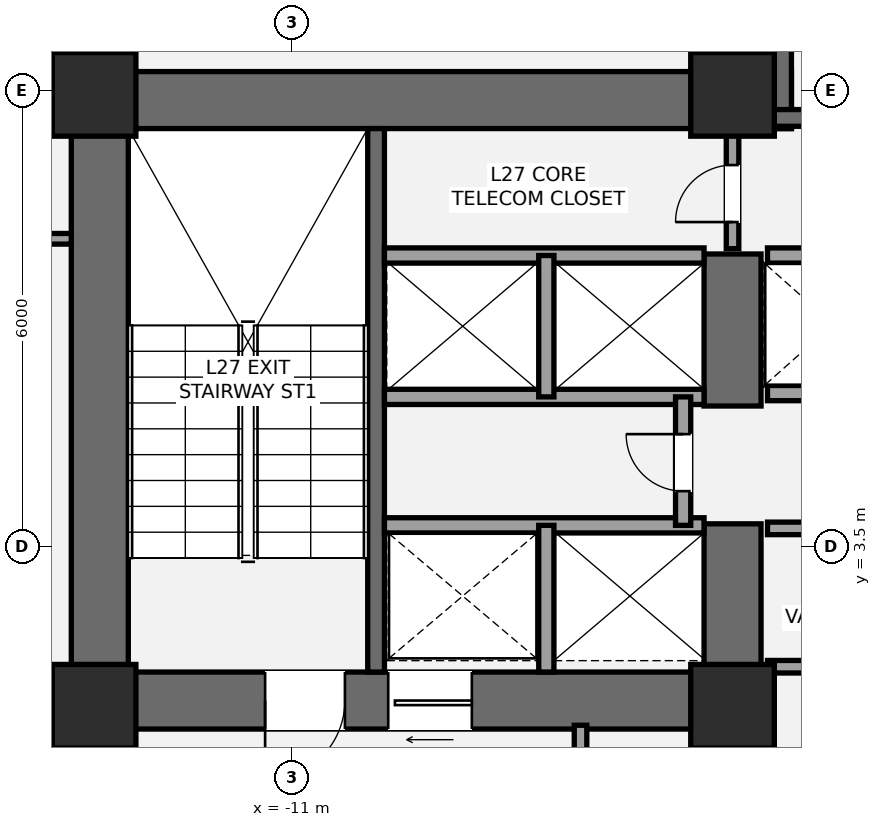
"""IFC4 building model, lengths in metres.
Left out: names, types, materials, properties, quantities, classifications, styles, units other than length and angle.
Written with IfcOpenShell. Run it as: python <this file> out.ifc"""

import sys

from ifc_helpers import new_model, si_unit, direction, frame, frame_2d, origin, origin_2d, place, context, subcontext, project, spatial, rectangle, extrude, element, fill, save


model = new_model("IFC4")
c1 = context("Model", 3, precision=1e-05, world=origin(), true_north=direction((0.0, 1.0)))
c2 = subcontext(c1, "Body", "Model", "MODEL_VIEW")
j1 = project(units=[si_unit("LENGTHUNIT", "METRE"), si_unit("PLANEANGLEUNIT", "RADIAN")], contexts=[c1])
p1 = place(None, origin())
s1 = spatial("IfcSite", under=j1, at=p1, CompositionType="ELEMENT")
p2 = place(p1, origin())
s2 = spatial("IfcBuilding", under=s1, at=p2, CompositionType="ELEMENT")
p3 = place(p2, frame((0.0, 0.0, 103.6)))
s3 = spatial("IfcBuildingStorey", under=s2, at=p3, CompositionType="ELEMENT", Elevation=103.6)
p4 = place(p3, frame((-13.525, 1.1, 0.0), z_axis=(0.0, 0.0, 1.0), x_axis=(0.0, 1.0, 0.0)))
e1 = element("IfcWall", 1, at=p4, inside=s3, PredefinedType="SHEAR", context=c2, shape_type="SweptSolid", body=[
    extrude(rectangle(XDim=8.65, YDim=0.75, at=frame_2d((4.325, 0.0))), origin(), (0.0, 0.0, 1.0), 3.5),
])
p5 = place(p3, frame((-13.9, 9.375, 0.0), z_axis=(0.0, 0.0, 1.0), x_axis=(1.0, 0.0, 0.0)))
e2 = element("IfcWall", 2, at=p5, inside=s3, PredefinedType="SHEAR", context=c2, shape_type="SweptSolid", body=[
    extrude(rectangle(XDim=9.475, YDim=0.75, at=frame_2d((4.737, 0.0))), origin(), (0.0, 0.0, 1.0), 3.5),
])
p6 = place(p3, frame((-4.825, 1.475, 0.0), z_axis=(0.0, 0.0, 1.0), x_axis=(-1.0, 0.0, 0.0)))
e3 = element("IfcWall", 3, at=p6, inside=s3, PredefinedType="SHEAR", context=c2, shape_type="SweptSolid", body=[
    extrude(rectangle(XDim=9.075, YDim=0.75, at=frame_2d((4.538, 0.0))), origin(), (0.0, 0.0, 1.0), 3.5),
])
p7 = place(p6, frame((5.475, 0.0, 0.0)))
e4 = element("IfcOpeningElement", 4, at=p7, cuts=e3, PredefinedType="OPENING", context=c2, shape_type="SweptSolid", body=[
    extrude(rectangle(XDim=1.05, YDim=2.15, at=frame_2d((0.525, 1.075))), frame((0.0, 0.385, 0.0), z_axis=(0.0, -1.0, 0.0), x_axis=(1.0, 0.0, 0.0)), (0.0, 0.0, 1.0), 0.77),
])
p8 = place(p6, frame((3.805, 0.0, 0.0)))
e5 = element("IfcOpeningElement", 5, at=p8, cuts=e3, PredefinedType="OPENING", context=c2, shape_type="SweptSolid", body=[
    extrude(rectangle(XDim=1.1, YDim=2.2, at=frame_2d((0.55, 1.1))), frame((0.0, 0.385, 0.0), z_axis=(0.0, -1.0, 0.0), x_axis=(1.0, 0.0, 0.0)), (0.0, 0.0, 1.0), 0.77),
])
p9 = place(p3, frame((-5.2, 1.1, 0.0), z_axis=(0.0, 0.0, 1.0), x_axis=(0.0, 1.0, 0.0)))
e6 = element("IfcWall", 6, at=p9, inside=s3, PredefinedType="SHEAR", context=c2, shape_type="SweptSolid", body=[
    extrude(rectangle(XDim=2.7, YDim=0.75, at=frame_2d((1.35, 0.0))), origin(), (0.0, 0.0, 1.0), 3.5),
])
p10 = place(p3, frame((-5.2, 5.35, 0.0), z_axis=(0.0, 0.0, 1.0), x_axis=(0.0, 1.0, 0.0)))
e7 = element("IfcWall", 7, at=p10, inside=s3, PredefinedType="SHEAR", context=c2, shape_type="SweptSolid", body=[
    extrude(rectangle(XDim=2.0, YDim=0.75, at=frame_2d((1.0, 0.0))), origin(), (0.0, 0.0, 1.0), 3.5),
])
p11 = place(p3, frame((-9.89, 1.85, 0.0), z_axis=(0.0, 0.0, 1.0), x_axis=(0.0, 1.0, 0.0)))
e8 = element("IfcWall", 8, at=p11, inside=s3, PredefinedType="SHEAR", context=c2, shape_type="SweptSolid", body=[
    extrude(rectangle(XDim=7.15, YDim=0.22, at=frame_2d((3.575, 0.0))), origin(), (0.0, 0.0, 1.0), 3.5),
])
p12 = place(p3, frame((-4.8, 9.0, 0.0), z_axis=(0.0, 0.0, 1.0), x_axis=(0.0, 1.0, 0.0)))
e9 = element("IfcWall", 9, at=p12, inside=s3, PredefinedType="SHEAR", context=c2, shape_type="SweptSolid", body=[
    extrude(rectangle(XDim=4.15, YDim=0.75, at=frame_2d((2.075, 0.0))), origin(), (0.0, 0.0, 1.0), 3.5),
])
p13 = place(p3, frame((-4.7, 9.14, 0.0), z_axis=(0.0, 0.0, 1.0), x_axis=(1.0, 0.0, 0.0)))
e10 = element("IfcWall", 10, at=p13, inside=s3, PredefinedType="SHEAR", context=c2, shape_type="SweptSolid", body=[
    extrude(rectangle(XDim=9.3, YDim=0.22, at=frame_2d((4.65, 0.0))), origin(), (0.0, 0.0, 1.0), 3.5),
])
p14 = place(p13, frame((1.15, 0.0, 0.0)))
e11 = element("IfcOpeningElement", 11, at=p14, cuts=e10, PredefinedType="OPENING", context=c2, shape_type="SweptSolid", body=[
    extrude(rectangle(XDim=1.05, YDim=2.15, at=frame_2d((0.525, 1.075))), frame((0.0, 0.12, 0.0), z_axis=(0.0, -1.0, 0.0), x_axis=(1.0, 0.0, 0.0)), (0.0, 0.0, 1.0), 0.24),
])
for number, where, z_axis, x_axis in (
    (12, (-13.6, 1.4, 0.0), (0.0, 0.0, 1.0), (1.0, 0.0, 0.0)),
    (13, (-13.6, 9.45, 0.0), (0.0, 0.0, 1.0), (1.0, 0.0, 0.0)),
    (14, (-5.2, 1.4, 0.0), (0.0, 0.0, 1.0), (1.0, 0.0, 0.0)),
    (15, (-5.2, 9.45, 0.0), (0.0, 0.0, 1.0), (1.0, 0.0, 0.0)),
):
    element("IfcColumn", number, at=place(p3, frame(where, z_axis=z_axis, x_axis=x_axis)), inside=s3, PredefinedType="COLUMN", context=c2, shape_type="SweptSolid", body=[
        extrude(rectangle(XDim=1.1, YDim=1.1, at=origin_2d()), origin(), (0.0, 0.0, 1.0), 3.5),
    ])
p15 = place(p3, frame((-13.45, -2.15, 0.0), z_axis=(0.0, 0.0, 1.0), x_axis=(0.0, 1.0, 0.0)))
e16 = element("IfcWall", 16, at=p15, inside=s3, PredefinedType="PARTITIONING", context=c2, shape_type="SweptSolid", body=[
    extrude(rectangle(XDim=3.3, YDim=0.165, at=frame_2d((1.65, 0.0))), origin(), (0.0, 0.0, 1.0), 2.763),
])
p16 = place(p15, frame((1.15, 0.0, 0.0)))
e17 = element("IfcOpeningElement", 17, at=p16, cuts=e16, PredefinedType="OPENING", context=c2, shape_type="SweptSolid", body=[
    extrude(rectangle(XDim=1.05, YDim=2.15, at=frame_2d((0.525, 1.075))), frame((0.0, 0.093, 0.0), z_axis=(0.0, -1.0, 0.0), x_axis=(1.0, 0.0, 0.0)), (0.0, 0.0, 1.0), 0.185),
])
p17 = place(p3, frame((-7.2, -2.15, 0.0), z_axis=(0.0, 0.0, 1.0), x_axis=(0.0, 1.0, 0.0)))
e18 = element("IfcWall", 18, at=p17, inside=s3, PredefinedType="PARTITIONING", context=c2, shape_type="SweptSolid", body=[
    extrude(rectangle(XDim=3.3, YDim=0.165, at=frame_2d((1.65, 0.0))), origin(), (0.0, 0.0, 1.0), 2.763),
])
p18 = place(p3, frame((-4.95, -2.15, 0.0), z_axis=(0.0, 0.0, 1.0), x_axis=(0.0, 1.0, 0.0)))
e19 = element("IfcWall", 19, at=p18, inside=s3, PredefinedType="SOLIDWALL", context=c2, shape_type="SweptSolid", body=[
    extrude(rectangle(XDim=3.3, YDim=0.2, at=frame_2d((1.65, 0.0))), origin(), (0.0, 0.0, 1.0), 2.763),
])
p19 = place(p18, frame((0.95, 0.0, 0.0)))
e20 = element("IfcOpeningElement", 20, at=p19, cuts=e19, PredefinedType="OPENING", context=c2, shape_type="SweptSolid", body=[
    extrude(rectangle(XDim=0.75, YDim=2.1, at=frame_2d((0.375, 1.05))), frame((0.0, 0.11, 0.0), z_axis=(0.0, -1.0, 0.0), x_axis=(1.0, 0.0, 0.0)), (0.0, 0.0, 1.0), 0.22),
])
p20 = place(p3, frame((-9.78, 3.78, 0.0), z_axis=(0.0, 0.0, 1.0), x_axis=(1.0, 0.0, 0.0)))
e21 = element("IfcWall", 21, at=p20, inside=s3, PredefinedType="SOLIDWALL", context=c2, shape_type="SweptSolid", body=[
    extrude(rectangle(XDim=4.205, YDim=0.2, at=frame_2d((2.103, 0.0))), origin(), (0.0, 0.0, 1.0), 3.31),
])
p21 = place(p3, frame((-7.65, 1.85, 0.0), z_axis=(0.0, 0.0, 1.0), x_axis=(0.0, 1.0, 0.0)))
e22 = element("IfcWall", 22, at=p21, inside=s3, PredefinedType="SOLIDWALL", context=c2, shape_type="SweptSolid", body=[
    extrude(rectangle(XDim=1.93, YDim=0.2, at=frame_2d((0.965, 0.0))), origin(), (0.0, 0.0, 1.0), 3.31),
])
for number, where, z_axis, x_axis in (
    (23, (-9.78, 5.47, 0.0), (0.0, 0.0, 1.0), (1.0, 0.0, 0.0)),
    (24, (-9.78, 7.33, 0.0), (0.0, 0.0, 1.0), (1.0, 0.0, 0.0)),
):
    element("IfcWall", number, at=place(p3, frame(where, z_axis=z_axis, x_axis=x_axis)), inside=s3, PredefinedType="SOLIDWALL", context=c2, shape_type="SweptSolid", body=[
        extrude(rectangle(XDim=4.205, YDim=0.2, at=frame_2d((2.103, 0.0))), origin(), (0.0, 0.0, 1.0), 3.31),
    ])
p22 = place(p3, frame((-7.65, 5.47, 0.0), z_axis=(0.0, 0.0, 1.0), x_axis=(0.0, 1.0, 0.0)))
e25 = element("IfcWall", 25, at=p22, inside=s3, PredefinedType="SOLIDWALL", context=c2, shape_type="SweptSolid", body=[
    extrude(rectangle(XDim=1.86, YDim=0.2, at=frame_2d((0.93, 0.0))), origin(), (0.0, 0.0, 1.0), 3.31),
])
p23 = place(p3, frame((-5.85, 3.78, 0.0), z_axis=(0.0, 0.0, 1.0), x_axis=(0.0, 1.0, 0.0)))
e26 = element("IfcWall", 26, at=p23, inside=s3, PredefinedType="SOLIDWALL", context=c2, shape_type="SweptSolid", body=[
    extrude(rectangle(XDim=1.69, YDim=0.2, at=frame_2d((0.845, 0.0))), origin(), (0.0, 0.0, 1.0), 3.31),
])
p24 = place(p23, frame((0.45, 0.0, 0.0)))
e27 = element("IfcOpeningElement", 27, at=p24, cuts=e26, PredefinedType="OPENING", context=c2, shape_type="SweptSolid", body=[
    extrude(rectangle(XDim=0.75, YDim=2.1, at=frame_2d((0.375, 1.05))), frame((0.0, 0.11, 0.0), z_axis=(0.0, -1.0, 0.0), x_axis=(1.0, 0.0, 0.0)), (0.0, 0.0, 1.0), 0.22),
])
p25 = place(p3, frame((-4.74, 1.92, 0.0), z_axis=(0.0, 0.0, 1.0), x_axis=(1.0, 0.0, 0.0)))
e28 = element("IfcWall", 28, at=p25, inside=s3, PredefinedType="PARTITIONING", context=c2, shape_type="SweptSolid", body=[
    extrude(rectangle(XDim=3.89, YDim=0.165, at=frame_2d((1.945, 0.0))), origin(), (0.0, 0.0, 1.0), 2.3),
])
p26 = place(p3, frame((-4.74, 3.74, 0.0), z_axis=(0.0, 0.0, 1.0), x_axis=(1.0, 0.0, 0.0)))
e29 = element("IfcWall", 29, at=p26, inside=s3, PredefinedType="PARTITIONING", context=c2, shape_type="SweptSolid", body=[
    extrude(rectangle(XDim=3.89, YDim=0.165, at=frame_2d((1.945, 0.0))), origin(), (0.0, 0.0, 1.0), 3.31),
])
p27 = place(p26, frame((1.6, 0.0, 0.0)))
e30 = element("IfcOpeningElement", 30, at=p27, cuts=e29, PredefinedType="OPENING", context=c2, shape_type="SweptSolid", body=[
    extrude(rectangle(XDim=0.85, YDim=2.1, at=frame_2d((0.425, 1.05))), frame((0.0, 0.093, 0.0), z_axis=(0.0, -1.0, 0.0), x_axis=(1.0, 0.0, 0.0)), (0.0, 0.0, 1.0), 0.185),
])
p28 = place(p3, frame((-4.74, 5.52, 0.0), z_axis=(0.0, 0.0, 1.0), x_axis=(1.0, 0.0, 0.0)))
e31 = element("IfcWall", 31, at=p28, inside=s3, PredefinedType="SOLIDWALL", context=c2, shape_type="SweptSolid", body=[
    extrude(rectangle(XDim=3.86, YDim=0.2, at=frame_2d((1.93, 0.0))), origin(), (0.0, 0.0, 1.0), 3.31),
])
p29 = place(p28, frame((0.55, 0.0, 0.0)))
e32 = element("IfcOpeningElement", 32, at=p29, cuts=e31, PredefinedType="OPENING", context=c2, shape_type="SweptSolid", body=[
    extrude(rectangle(XDim=1.1, YDim=2.2, at=frame_2d((0.55, 1.1))), frame((0.0, 0.11, 0.0), z_axis=(0.0, -1.0, 0.0), x_axis=(1.0, 0.0, 0.0)), (0.0, 0.0, 1.0), 0.22),
])
p30 = place(p28, frame((2.3, 0.0, 0.0)))
e33 = element("IfcOpeningElement", 33, at=p30, cuts=e31, PredefinedType="OPENING", context=c2, shape_type="SweptSolid", body=[
    extrude(rectangle(XDim=1.1, YDim=2.2, at=frame_2d((0.55, 1.1))), frame((0.0, 0.11, 0.0), z_axis=(0.0, -1.0, 0.0), x_axis=(1.0, 0.0, 0.0)), (0.0, 0.0, 1.0), 0.22),
])
p31 = place(p3, frame((-4.74, 7.33, 0.0), z_axis=(0.0, 0.0, 1.0), x_axis=(1.0, 0.0, 0.0)))
e34 = element("IfcWall", 34, at=p31, inside=s3, PredefinedType="SOLIDWALL", context=c2, shape_type="SweptSolid", body=[
    extrude(rectangle(XDim=3.86, YDim=0.2, at=frame_2d((1.93, 0.0))), origin(), (0.0, 0.0, 1.0), 3.31),
])
p32 = place(p3, frame((-5.2, 7.42, 0.0), z_axis=(0.0, 0.0, 1.0), x_axis=(0.0, 1.0, 0.0)))
e35 = element("IfcWall", 35, at=p32, inside=s3, PredefinedType="PARTITIONING", context=c2, shape_type="SweptSolid", body=[
    extrude(rectangle(XDim=1.58, YDim=0.165, at=frame_2d((0.79, 0.0))), origin(), (0.0, 0.0, 1.0), 3.31),
])
p33 = place(p32, frame((0.35, 0.0, 0.0)))
e36 = element("IfcOpeningElement", 36, at=p33, cuts=e35, PredefinedType="OPENING", context=c2, shape_type="SweptSolid", body=[
    extrude(rectangle(XDim=0.75, YDim=2.1, at=frame_2d((0.375, 1.05))), frame((0.0, 0.093, 0.0), z_axis=(0.0, -1.0, 0.0), x_axis=(1.0, 0.0, 0.0)), (0.0, 0.0, 1.0), 0.185),
])
p34 = place(p3, frame((-17.5, 7.55, 0.0), z_axis=(0.0, 0.0, 1.0), x_axis=(1.0, 0.0, 0.0)))
e37 = element("IfcWall", 37, at=p34, inside=s3, PredefinedType="PARTITIONING", context=c2, shape_type="SweptSolid", body=[
    extrude(rectangle(XDim=3.6, YDim=0.14, at=frame_2d((1.8, 0.0))), origin(), (0.0, 0.0, 1.0), 3.31),
])
p35 = place(p34, frame((0.32, 0.0, 0.0)))
e38 = element("IfcOpeningElement", 38, at=p35, cuts=e37, PredefinedType="OPENING", context=c2, shape_type="SweptSolid", body=[
    extrude(rectangle(XDim=0.92, YDim=2.15, at=frame_2d((0.46, 1.075))), frame((0.0, 0.08, 0.0), z_axis=(0.0, -1.0, 0.0), x_axis=(1.0, 0.0, 0.0)), (0.0, 0.0, 1.0), 0.16),
])
p36 = place(p7, origin())
e39 = element("IfcDoor", 39, at=p36, inside=s3, OperationType="SINGLE_SWING_RIGHT", PredefinedType="DOOR", context=c2, shape_type="SweptSolid", body=[
    extrude(rectangle(XDim=1.05, YDim=2.15, at=frame_2d((0.525, 1.075))), frame((0.0, 0.025, 0.0), z_axis=(0.0, -1.0, 0.0), x_axis=(1.0, 0.0, 0.0)), (0.0, 0.0, 1.0), 0.05),
])
fill(e4, e39)
p37 = place(p8, origin())
e40 = element("IfcDoor", 40, at=p37, inside=s3, OperationType="SLIDING_TO_LEFT", PredefinedType="DOOR", context=c2, shape_type="SweptSolid", body=[
    extrude(rectangle(XDim=1.1, YDim=2.2, at=frame_2d((0.55, 1.1))), frame((0.0, 0.025, 0.0), z_axis=(0.0, -1.0, 0.0), x_axis=(1.0, 0.0, 0.0)), (0.0, 0.0, 1.0), 0.05),
])
fill(e5, e40)
p38 = place(p24, origin())
e41 = element("IfcDoor", 41, at=p38, inside=s3, OperationType="SINGLE_SWING_RIGHT", PredefinedType="DOOR", context=c2, shape_type="SweptSolid", body=[
    extrude(rectangle(XDim=0.75, YDim=2.1, at=frame_2d((0.375, 1.05))), frame((0.0, 0.025, 0.0), z_axis=(0.0, -1.0, 0.0), x_axis=(1.0, 0.0, 0.0)), (0.0, 0.0, 1.0), 0.05),
])
fill(e27, e41)
p39 = place(p33, origin())
e42 = element("IfcDoor", 42, at=p39, inside=s3, OperationType="SINGLE_SWING_LEFT", PredefinedType="DOOR", context=c2, shape_type="SweptSolid", body=[
    extrude(rectangle(XDim=0.75, YDim=2.1, at=frame_2d((0.375, 1.05))), frame((0.0, 0.025, 0.0), z_axis=(0.0, -1.0, 0.0), x_axis=(1.0, 0.0, 0.0)), (0.0, 0.0, 1.0), 0.05),
])
fill(e36, e42)
save(model, sys.argv[1])
